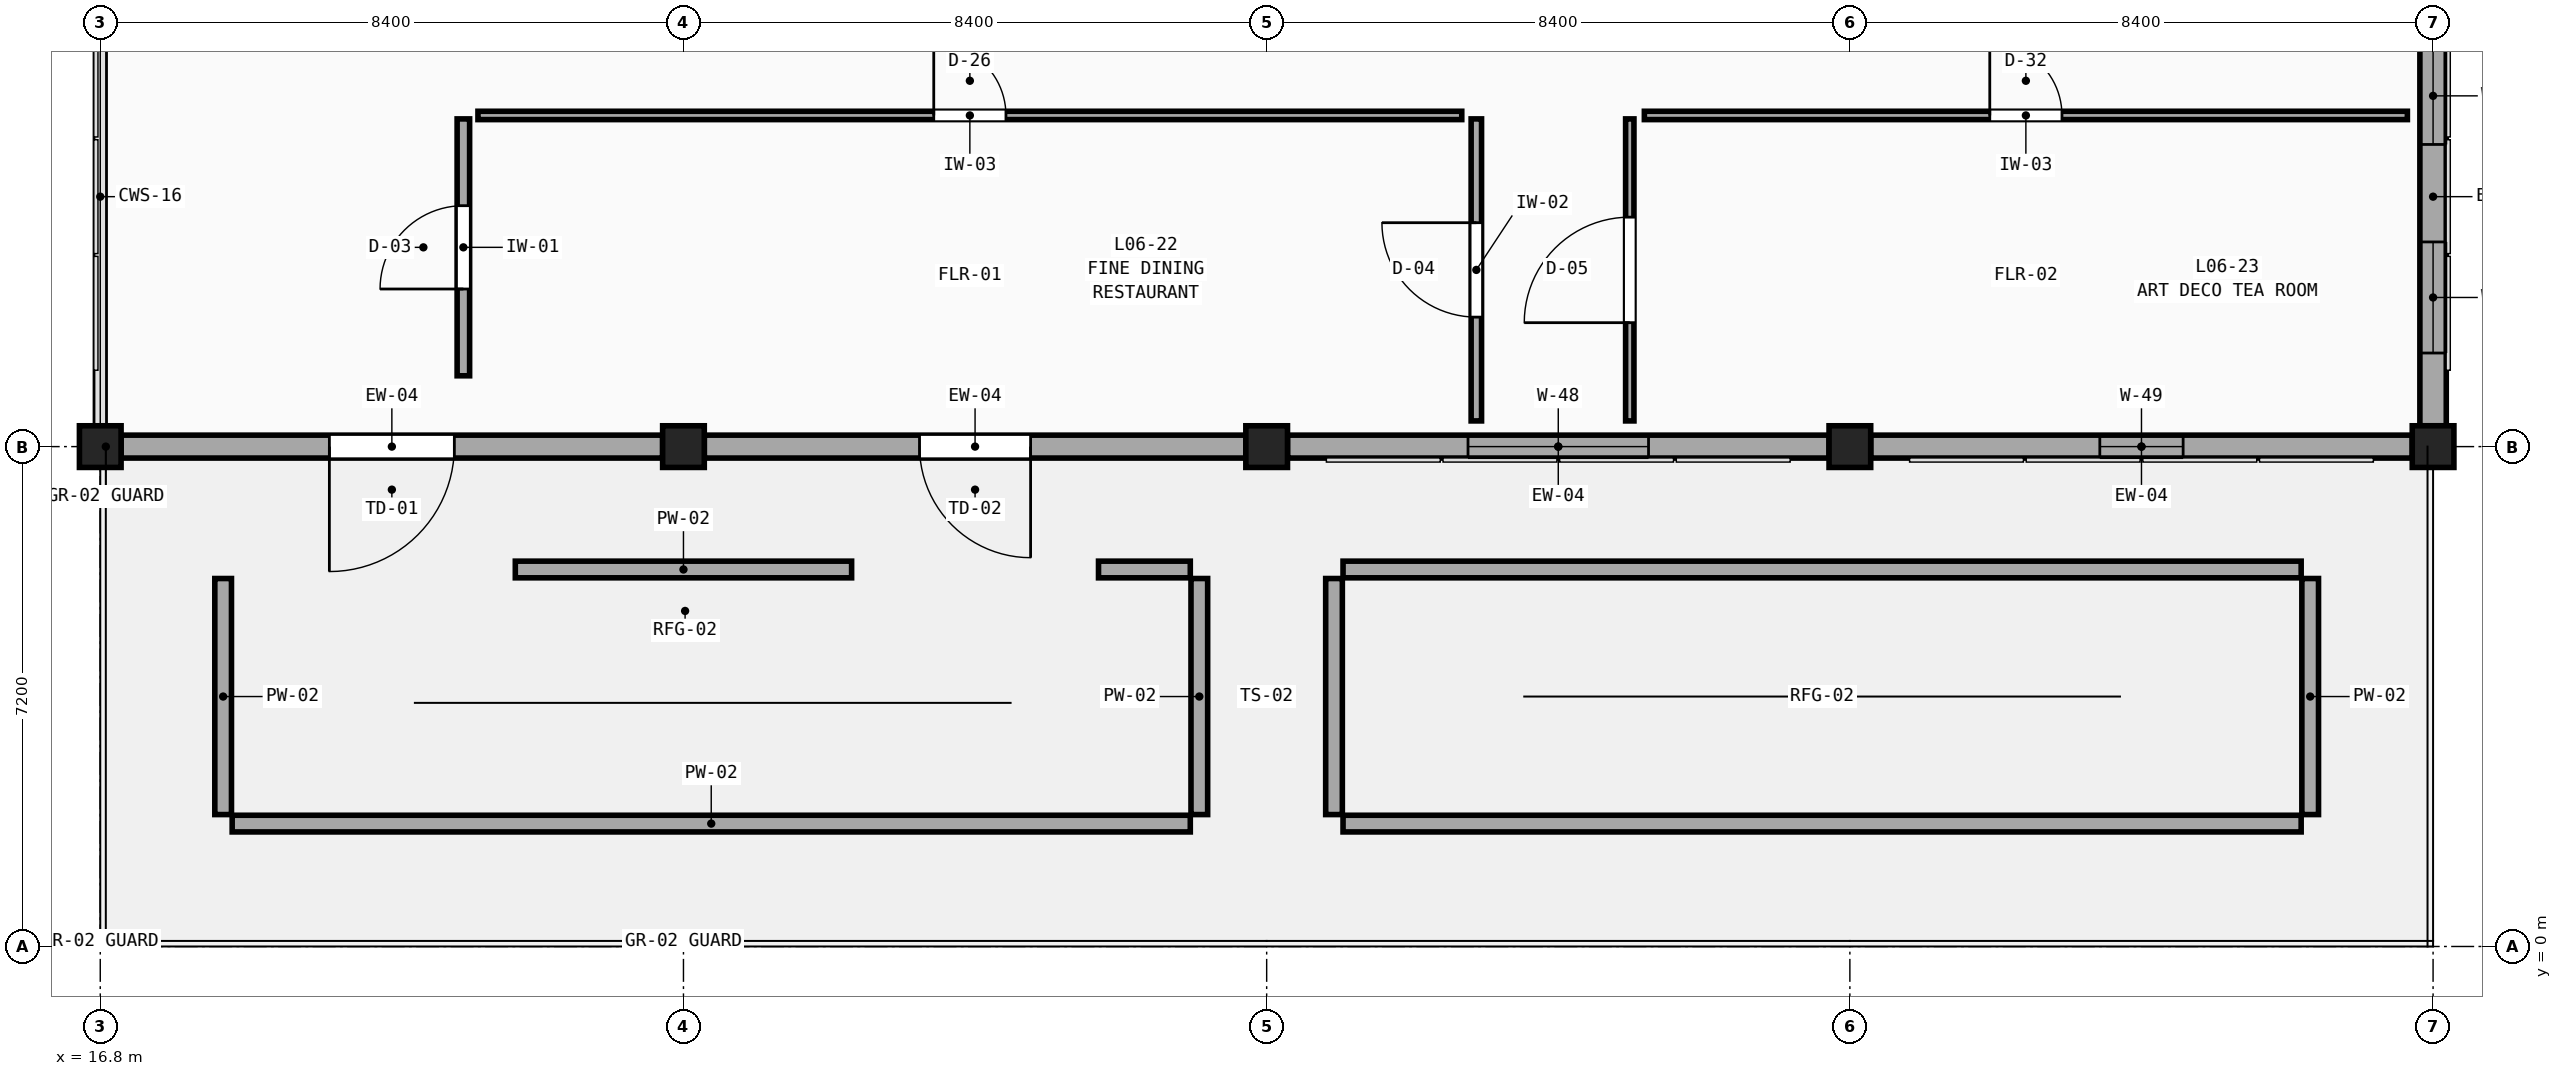
"""IFC4 building model, lengths in metres.
Left out: names, types, materials, properties, quantities, classifications, styles, units other than length and angle.
Written with IfcOpenShell. Run it as: python <this file> out.ifc"""

import sys

from ifc_helpers import new_model, si_unit, direction, frame, frame_2d, origin, origin_2d, place, context, subcontext, project, spatial, rectangle, extrude, element, fill, save


model = new_model("IFC4")
c1 = context("Model", 3, precision=1e-05, world=origin(), true_north=direction((0.0, 1.0)))
c2 = subcontext(c1, "Body", "Model", "MODEL_VIEW")
j1 = project(units=[si_unit("LENGTHUNIT", "METRE"), si_unit("PLANEANGLEUNIT", "RADIAN")], contexts=[c1])
p1 = place(None, origin())
s1 = spatial("IfcSite", under=j1, at=p1, CompositionType="ELEMENT")
p2 = place(p1, origin())
s2 = spatial("IfcBuilding", under=s1, at=p2, CompositionType="ELEMENT")
p3 = place(p2, frame((0.0, 0.0, 27.9)))
s3 = spatial("IfcBuildingStorey", under=s2, at=p3, CompositionType="ELEMENT", Elevation=27.9)
for number, where, z_axis, x_axis in (
    (1, (16.8, 7.2, 0.0), (0.0, 0.0, 1.0), (1.0, 0.0, 0.0)),
    (2, (25.2, 7.2, 0.0), (0.0, 0.0, 1.0), (1.0, 0.0, 0.0)),
    (3, (33.6, 7.2, 0.0), (0.0, 0.0, 1.0), (1.0, 0.0, 0.0)),
    (4, (42.0, 7.2, 0.0), (0.0, 0.0, 1.0), (1.0, 0.0, 0.0)),
    (5, (50.4, 7.2, 0.0), (0.0, 0.0, 1.0), (1.0, 0.0, 0.0)),
):
    element("IfcColumn", number, at=place(p3, frame(where, z_axis=z_axis, x_axis=x_axis)), inside=s3, PredefinedType="COLUMN", context=c2, shape_type="SweptSolid", body=[
        extrude(rectangle(XDim=0.6, YDim=0.6, at=origin_2d()), origin(), (0.0, 0.0, 1.0), 4.2),
    ])
p4 = place(p3, frame((24.9, 7.2, 0.0), z_axis=(0.0, 0.0, 1.0), x_axis=(-1.0, 0.0, 0.0)))
e6 = element("IfcWall", 6, at=p4, inside=s3, PredefinedType="SOLIDWALL", context=c2, shape_type="SweptSolid", body=[
    extrude(rectangle(XDim=7.8, YDim=0.33, at=frame_2d((3.9, 0.0))), origin(), (0.0, 0.0, 1.0), 3.36),
])
p5 = place(p4, frame((3.0, 0.0, 0.0)))
e7 = element("IfcOpeningElement", 7, at=p5, cuts=e6, PredefinedType="OPENING", context=c2, shape_type="SweptSolid", body=[
    extrude(rectangle(XDim=1.8, YDim=2.25, at=frame_2d((0.9, 1.125))), frame((0.0, 0.185, 0.0), z_axis=(0.0, -1.0, 0.0), x_axis=(1.0, 0.0, 0.0)), (0.0, 0.0, 1.0), 0.37),
])
p6 = place(p3, frame((33.3, 7.2, 0.0), z_axis=(0.0, 0.0, 1.0), x_axis=(-1.0, 0.0, 0.0)))
e8 = element("IfcWall", 8, at=p6, inside=s3, PredefinedType="SOLIDWALL", context=c2, shape_type="SweptSolid", body=[
    extrude(rectangle(XDim=7.8, YDim=0.33, at=frame_2d((3.9, 0.0))), origin(), (0.0, 0.0, 1.0), 3.36),
])
p7 = place(p6, frame((3.1, 0.0, 0.0)))
e9 = element("IfcOpeningElement", 9, at=p7, cuts=e8, PredefinedType="OPENING", context=c2, shape_type="SweptSolid", body=[
    extrude(rectangle(XDim=1.6, YDim=2.2, at=frame_2d((0.8, 1.1))), frame((0.0, 0.185, 0.0), z_axis=(0.0, -1.0, 0.0), x_axis=(1.0, 0.0, 0.0)), (0.0, 0.0, 1.0), 0.37),
])
p8 = place(p3, frame((41.7, 7.2, 0.0), z_axis=(0.0, 0.0, 1.0), x_axis=(-1.0, 0.0, 0.0)))
e10 = element("IfcWall", 10, at=p8, inside=s3, PredefinedType="SOLIDWALL", context=c2, shape_type="SweptSolid", body=[
    extrude(rectangle(XDim=7.8, YDim=0.33, at=frame_2d((3.9, 0.0))), origin(), (0.0, 0.0, 1.0), 3.36),
])
p9 = place(p8, frame((2.6, 0.0, 0.75)))
e11 = element("IfcOpeningElement", 11, at=p9, cuts=e10, PredefinedType="OPENING", context=c2, shape_type="SweptSolid", body=[
    extrude(rectangle(XDim=2.6, YDim=2.41, at=frame_2d((1.3, 1.205))), frame((0.0, 0.185, 0.0), z_axis=(0.0, -1.0, 0.0), x_axis=(1.0, 0.0, 0.0)), (0.0, 0.0, 1.0), 0.37),
])
p10 = place(p3, frame((50.1, 7.2, 0.0), z_axis=(0.0, 0.0, 1.0), x_axis=(-1.0, 0.0, 0.0)))
e12 = element("IfcWall", 12, at=p10, inside=s3, PredefinedType="SOLIDWALL", context=c2, shape_type="SweptSolid", body=[
    extrude(rectangle(XDim=7.8, YDim=0.33, at=frame_2d((3.9, 0.0))), origin(), (0.0, 0.0, 1.0), 3.36),
])
p11 = place(p10, frame((3.3, 0.0, 0.75)))
e13 = element("IfcOpeningElement", 13, at=p11, cuts=e12, PredefinedType="OPENING", context=c2, shape_type="SweptSolid", body=[
    extrude(rectangle(XDim=1.2, YDim=2.41, at=frame_2d((0.6, 1.205))), frame((0.0, 0.185, 0.0), z_axis=(0.0, -1.0, 0.0), x_axis=(1.0, 0.0, 0.0)), (0.0, 0.0, 1.0), 0.37),
])
p12 = place(p3, frame((50.4, 14.1, 0.0), z_axis=(0.0, 0.0, 1.0), x_axis=(0.0, -1.0, 0.0)))
e14 = element("IfcWall", 14, at=p12, inside=s3, PredefinedType="SOLIDWALL", context=c2, shape_type="SweptSolid", body=[
    extrude(rectangle(XDim=6.6, YDim=0.38, at=frame_2d((3.3, 0.0))), origin(), (0.0, 0.0, 1.0), 3.36),
])
p13 = place(p12, frame((1.148, 0.0, 0.75)))
e15 = element("IfcOpeningElement", 15, at=p13, cuts=e14, PredefinedType="OPENING", context=c2, shape_type="SweptSolid", body=[
    extrude(rectangle(XDim=1.4, YDim=2.46, at=frame_2d((0.7, 1.23))), frame((0.0, 0.21, 0.0), z_axis=(0.0, -1.0, 0.0), x_axis=(1.0, 0.0, 0.0)), (0.0, 0.0, 1.0), 0.42),
])
p14 = place(p12, frame((3.952, 0.0, 0.75)))
e16 = element("IfcOpeningElement", 16, at=p14, cuts=e14, PredefinedType="OPENING", context=c2, shape_type="SweptSolid", body=[
    extrude(rectangle(XDim=1.6, YDim=2.46, at=frame_2d((0.8, 1.23))), frame((0.0, 0.21, 0.0), z_axis=(0.0, -1.0, 0.0), x_axis=(1.0, 0.0, 0.0)), (0.0, 0.0, 1.0), 0.42),
])
p15 = place(p3, frame((22.778, 5.43, 0.0), z_axis=(0.0, 0.0, 1.0), x_axis=(1.0, 0.0, 0.0)))
e17 = element("IfcWall", 17, at=p15, inside=s3, PredefinedType="PARAPET", context=c2, shape_type="SweptSolid", body=[
    extrude(rectangle(XDim=4.844, YDim=0.24, at=frame_2d((2.422, 0.0))), origin(), (0.0, 0.0, 1.0), 0.5),
])
p16 = place(p3, frame((31.178, 5.43, 0.0), z_axis=(0.0, 0.0, 1.0), x_axis=(1.0, 0.0, 0.0)))
e18 = element("IfcWall", 18, at=p16, inside=s3, PredefinedType="PARAPET", context=c2, shape_type="SweptSolid", body=[
    extrude(rectangle(XDim=1.322, YDim=0.24, at=frame_2d((0.661, 0.0))), origin(), (0.0, 0.0, 1.0), 0.5),
])
p17 = place(p3, frame((32.63, 5.3, 0.0), z_axis=(0.0, 0.0, 1.0), x_axis=(0.0, -1.0, 0.0)))
e19 = element("IfcWall", 19, at=p17, inside=s3, PredefinedType="PARAPET", context=c2, shape_type="SweptSolid", body=[
    extrude(rectangle(XDim=3.4, YDim=0.24, at=frame_2d((1.7, 0.0))), origin(), (0.0, 0.0, 1.0), 0.5),
])
p18 = place(p3, frame((32.5, 1.77, 0.0), z_axis=(0.0, 0.0, 1.0), x_axis=(-1.0, 0.0, 0.0)))
e20 = element("IfcWall", 20, at=p18, inside=s3, PredefinedType="PARAPET", context=c2, shape_type="SweptSolid", body=[
    extrude(rectangle(XDim=13.8, YDim=0.24, at=frame_2d((6.9, 0.0))), origin(), (0.0, 0.0, 1.0), 0.5),
])
for number, where, z_axis, x_axis in (
    (21, (18.57, 1.9, 0.0), (0.0, 0.0, 1.0), (0.0, 1.0, 0.0)),
    (22, (48.63, 5.3, 0.0), (0.0, 0.0, 1.0), (0.0, -1.0, 0.0)),
):
    element("IfcWall", number, at=place(p3, frame(where, z_axis=z_axis, x_axis=x_axis)), inside=s3, PredefinedType="PARAPET", context=c2, shape_type="SweptSolid", body=[
        extrude(rectangle(XDim=3.4, YDim=0.24, at=frame_2d((1.7, 0.0))), origin(), (0.0, 0.0, 1.0), 0.5),
    ])
p19 = place(p3, frame((48.5, 1.77, 0.0), z_axis=(0.0, 0.0, 1.0), x_axis=(-1.0, 0.0, 0.0)))
e23 = element("IfcWall", 23, at=p19, inside=s3, PredefinedType="PARAPET", context=c2, shape_type="SweptSolid", body=[
    extrude(rectangle(XDim=13.8, YDim=0.24, at=frame_2d((6.9, 0.0))), origin(), (0.0, 0.0, 1.0), 0.5),
])
p20 = place(p3, frame((34.57, 1.9, 0.0), z_axis=(0.0, 0.0, 1.0), x_axis=(0.0, 1.0, 0.0)))
e24 = element("IfcWall", 24, at=p20, inside=s3, PredefinedType="PARAPET", context=c2, shape_type="SweptSolid", body=[
    extrude(rectangle(XDim=3.4, YDim=0.24, at=frame_2d((1.7, 0.0))), origin(), (0.0, 0.0, 1.0), 0.5),
])
p21 = place(p3, frame((34.7, 5.43, 0.0), z_axis=(0.0, 0.0, 1.0), x_axis=(1.0, 0.0, 0.0)))
e25 = element("IfcWall", 25, at=p21, inside=s3, PredefinedType="PARAPET", context=c2, shape_type="SweptSolid", body=[
    extrude(rectangle(XDim=13.8, YDim=0.24, at=frame_2d((6.9, 0.0))), origin(), (0.0, 0.0, 1.0), 0.5),
])
p22 = place(p3, frame((22.24, 11.97, 0.0), z_axis=(0.0, 0.0, 1.0), x_axis=(1.0, 0.0, 0.0)))
e26 = element("IfcWall", 26, at=p22, inside=s3, PredefinedType="PARTITIONING", context=c2, shape_type="SweptSolid", body=[
    extrude(rectangle(XDim=14.17, YDim=0.12, at=frame_2d((7.085, 0.0))), origin(), (0.0, 0.0, 1.0), 3.91),
])
p23 = place(p22, frame((6.565, 0.0, 0.0)))
e27 = element("IfcOpeningElement", 27, at=p23, cuts=e26, PredefinedType="OPENING", context=c2, shape_type="SweptSolid", body=[
    extrude(rectangle(XDim=1.04, YDim=2.37, at=frame_2d((0.52, 1.185))), frame((0.0, 0.08, 0.0), z_axis=(0.0, -1.0, 0.0), x_axis=(1.0, 0.0, 0.0)), (0.0, 0.0, 1.0), 0.16),
])
p24 = place(p3, frame((39.04, 11.97, 0.0), z_axis=(0.0, 0.0, 1.0), x_axis=(1.0, 0.0, 0.0)))
e28 = element("IfcWall", 28, at=p24, inside=s3, PredefinedType="PARTITIONING", context=c2, shape_type="SweptSolid", body=[
    extrude(rectangle(XDim=10.99, YDim=0.12, at=frame_2d((5.495, 0.0))), origin(), (0.0, 0.0, 1.0), 3.91),
])
p25 = place(p24, frame((4.975, 0.0, 0.0)))
e29 = element("IfcOpeningElement", 29, at=p25, cuts=e28, PredefinedType="OPENING", context=c2, shape_type="SweptSolid", body=[
    extrude(rectangle(XDim=1.04, YDim=2.45, at=frame_2d((0.52, 1.225))), frame((0.0, 0.08, 0.0), z_axis=(0.0, -1.0, 0.0), x_axis=(1.0, 0.0, 0.0)), (0.0, 0.0, 1.0), 0.16),
])
p26 = place(p3, frame((22.03, 8.22, 0.0), z_axis=(0.0, 0.0, 1.0), x_axis=(0.0, 1.0, 0.0)))
e30 = element("IfcWall", 30, at=p26, inside=s3, PredefinedType="PARTITIONING", context=c2, shape_type="SweptSolid", body=[
    extrude(rectangle(XDim=3.7, YDim=0.18, at=frame_2d((1.85, 0.0))), origin(), (0.0, 0.0, 1.0), 3.91),
])
p27 = place(p26, frame((1.25, 0.0, 0.0)))
e31 = element("IfcOpeningElement", 31, at=p27, cuts=e30, PredefinedType="OPENING", context=c2, shape_type="SweptSolid", body=[
    extrude(rectangle(XDim=1.2, YDim=2.05, at=frame_2d((0.6, 1.025))), frame((0.0, 0.11, 0.0), z_axis=(0.0, -1.0, 0.0), x_axis=(1.0, 0.0, 0.0)), (0.0, 0.0, 1.0), 0.22),
])
p28 = place(p3, frame((36.62, 7.57, 0.0), z_axis=(0.0, 0.0, 1.0), x_axis=(0.0, 1.0, 0.0)))
e32 = element("IfcWall", 32, at=p28, inside=s3, PredefinedType="PARTITIONING", context=c2, shape_type="SweptSolid", body=[
    extrude(rectangle(XDim=4.35, YDim=0.15, at=frame_2d((2.175, 0.0))), origin(), (0.0, 0.0, 1.0), 3.91),
])
p29 = place(p28, frame((1.495, 0.0, 0.0)))
e33 = element("IfcOpeningElement", 33, at=p29, cuts=e32, PredefinedType="OPENING", context=c2, shape_type="SweptSolid", body=[
    extrude(rectangle(XDim=1.36, YDim=2.05, at=frame_2d((0.68, 1.025))), frame((0.0, 0.095, 0.0), z_axis=(0.0, -1.0, 0.0), x_axis=(1.0, 0.0, 0.0)), (0.0, 0.0, 1.0), 0.19),
])
p30 = place(p3, frame((38.83, 7.57, 0.0), z_axis=(0.0, 0.0, 1.0), x_axis=(0.0, 1.0, 0.0)))
e34 = element("IfcWall", 34, at=p30, inside=s3, PredefinedType="PARTITIONING", context=c2, shape_type="SweptSolid", body=[
    extrude(rectangle(XDim=4.35, YDim=0.12, at=frame_2d((2.175, 0.0))), origin(), (0.0, 0.0, 1.0), 3.91),
])
p31 = place(p30, frame((1.415, 0.0, 0.0)))
e35 = element("IfcOpeningElement", 35, at=p31, cuts=e34, PredefinedType="OPENING", context=c2, shape_type="SweptSolid", body=[
    extrude(rectangle(XDim=1.52, YDim=2.05, at=frame_2d((0.76, 1.025))), frame((0.0, 0.08, 0.0), z_axis=(0.0, -1.0, 0.0), x_axis=(1.0, 0.0, 0.0)), (0.0, 0.0, 1.0), 0.16),
])
p32 = place(p5, origin())
e36 = element("IfcDoor", 36, at=p32, inside=s3, OperationType="SINGLE_SWING_RIGHT", PredefinedType="DOOR", context=c2, shape_type="SweptSolid", body=[
    extrude(rectangle(XDim=1.8, YDim=2.25, at=frame_2d((0.9, 1.125))), frame((0.0, 0.025, 0.0), z_axis=(0.0, -1.0, 0.0), x_axis=(1.0, 0.0, 0.0)), (0.0, 0.0, 1.0), 0.05),
])
fill(e7, e36)
p33 = place(p7, origin())
e37 = element("IfcDoor", 37, at=p33, inside=s3, OperationType="SINGLE_SWING_LEFT", PredefinedType="DOOR", context=c2, shape_type="SweptSolid", body=[
    extrude(rectangle(XDim=1.6, YDim=2.2, at=frame_2d((0.8, 1.1))), frame((0.0, 0.025, 0.0), z_axis=(0.0, -1.0, 0.0), x_axis=(1.0, 0.0, 0.0)), (0.0, 0.0, 1.0), 0.05),
])
fill(e9, e37)
p34 = place(p9, origin())
e38 = element("IfcWindow", 38, at=p34, inside=s3, PartitioningType="TRIPLE_PANEL_VERTICAL", PredefinedType="WINDOW", context=c2, shape_type="SweptSolid", body=[
    extrude(rectangle(XDim=2.6, YDim=2.41, at=frame_2d((1.3, 1.205))), frame((0.0, 0.03, 0.0), z_axis=(0.0, -1.0, 0.0), x_axis=(1.0, 0.0, 0.0)), (0.0, 0.0, 1.0), 0.06),
])
fill(e11, e38)
p35 = place(p11, origin())
e39 = element("IfcWindow", 39, at=p35, inside=s3, PartitioningType="SINGLE_PANEL", PredefinedType="WINDOW", context=c2, shape_type="SweptSolid", body=[
    extrude(rectangle(XDim=1.2, YDim=2.41, at=frame_2d((0.6, 1.205))), frame((0.0, 0.03, 0.0), z_axis=(0.0, -1.0, 0.0), x_axis=(1.0, 0.0, 0.0)), (0.0, 0.0, 1.0), 0.06),
])
fill(e13, e39)
p36 = place(p13, origin())
e40 = element("IfcWindow", 40, at=p36, inside=s3, PartitioningType="DOUBLE_PANEL_VERTICAL", PredefinedType="WINDOW", context=c2, shape_type="SweptSolid", body=[
    extrude(rectangle(XDim=1.4, YDim=2.46, at=frame_2d((0.7, 1.23))), frame((0.0, 0.03, 0.0), z_axis=(0.0, -1.0, 0.0), x_axis=(1.0, 0.0, 0.0)), (0.0, 0.0, 1.0), 0.06),
])
fill(e15, e40)
p37 = place(p14, origin())
e41 = element("IfcWindow", 41, at=p37, inside=s3, PartitioningType="DOUBLE_PANEL_VERTICAL", PredefinedType="WINDOW", context=c2, shape_type="SweptSolid", body=[
    extrude(rectangle(XDim=1.6, YDim=2.46, at=frame_2d((0.8, 1.23))), frame((0.0, 0.03, 0.0), z_axis=(0.0, -1.0, 0.0), x_axis=(1.0, 0.0, 0.0)), (0.0, 0.0, 1.0), 0.06),
])
fill(e16, e41)
p38 = place(p23, origin())
e42 = element("IfcDoor", 42, at=p38, inside=s3, OperationType="SINGLE_SWING_LEFT", PredefinedType="DOOR", context=c2, shape_type="SweptSolid", body=[
    extrude(rectangle(XDim=1.04, YDim=2.37, at=frame_2d((0.52, 1.185))), frame((0.0, 0.025, 0.0), z_axis=(0.0, -1.0, 0.0), x_axis=(1.0, 0.0, 0.0)), (0.0, 0.0, 1.0), 0.05),
])
fill(e27, e42)
p39 = place(p25, origin())
e43 = element("IfcDoor", 43, at=p39, inside=s3, OperationType="SINGLE_SWING_LEFT", PredefinedType="DOOR", context=c2, shape_type="SweptSolid", body=[
    extrude(rectangle(XDim=1.04, YDim=2.45, at=frame_2d((0.52, 1.225))), frame((0.0, 0.025, 0.0), z_axis=(0.0, -1.0, 0.0), x_axis=(1.0, 0.0, 0.0)), (0.0, 0.0, 1.0), 0.05),
])
fill(e29, e43)
p40 = place(p27, origin())
e44 = element("IfcDoor", 44, at=p40, inside=s3, OperationType="SINGLE_SWING_LEFT", PredefinedType="DOOR", context=c2, shape_type="SweptSolid", body=[
    extrude(rectangle(XDim=1.2, YDim=2.05, at=frame_2d((0.6, 1.025))), frame((0.0, 0.025, 0.0), z_axis=(0.0, -1.0, 0.0), x_axis=(1.0, 0.0, 0.0)), (0.0, 0.0, 1.0), 0.05),
])
fill(e31, e44)
p41 = place(p29, origin())
e45 = element("IfcDoor", 45, at=p41, inside=s3, OperationType="SINGLE_SWING_RIGHT", PredefinedType="DOOR", context=c2, shape_type="SweptSolid", body=[
    extrude(rectangle(XDim=1.36, YDim=2.05, at=frame_2d((0.68, 1.025))), frame((0.0, 0.025, 0.0), z_axis=(0.0, -1.0, 0.0), x_axis=(1.0, 0.0, 0.0)), (0.0, 0.0, 1.0), 0.05),
])
fill(e33, e45)
p42 = place(p31, origin())
e46 = element("IfcDoor", 46, at=p42, inside=s3, OperationType="SINGLE_SWING_LEFT", PredefinedType="DOOR", context=c2, shape_type="SweptSolid", body=[
    extrude(rectangle(XDim=1.52, YDim=2.05, at=frame_2d((0.76, 1.025))), frame((0.0, 0.025, 0.0), z_axis=(0.0, -1.0, 0.0), x_axis=(1.0, 0.0, 0.0)), (0.0, 0.0, 1.0), 0.05),
])
fill(e35, e46)
save(model, sys.argv[1])
